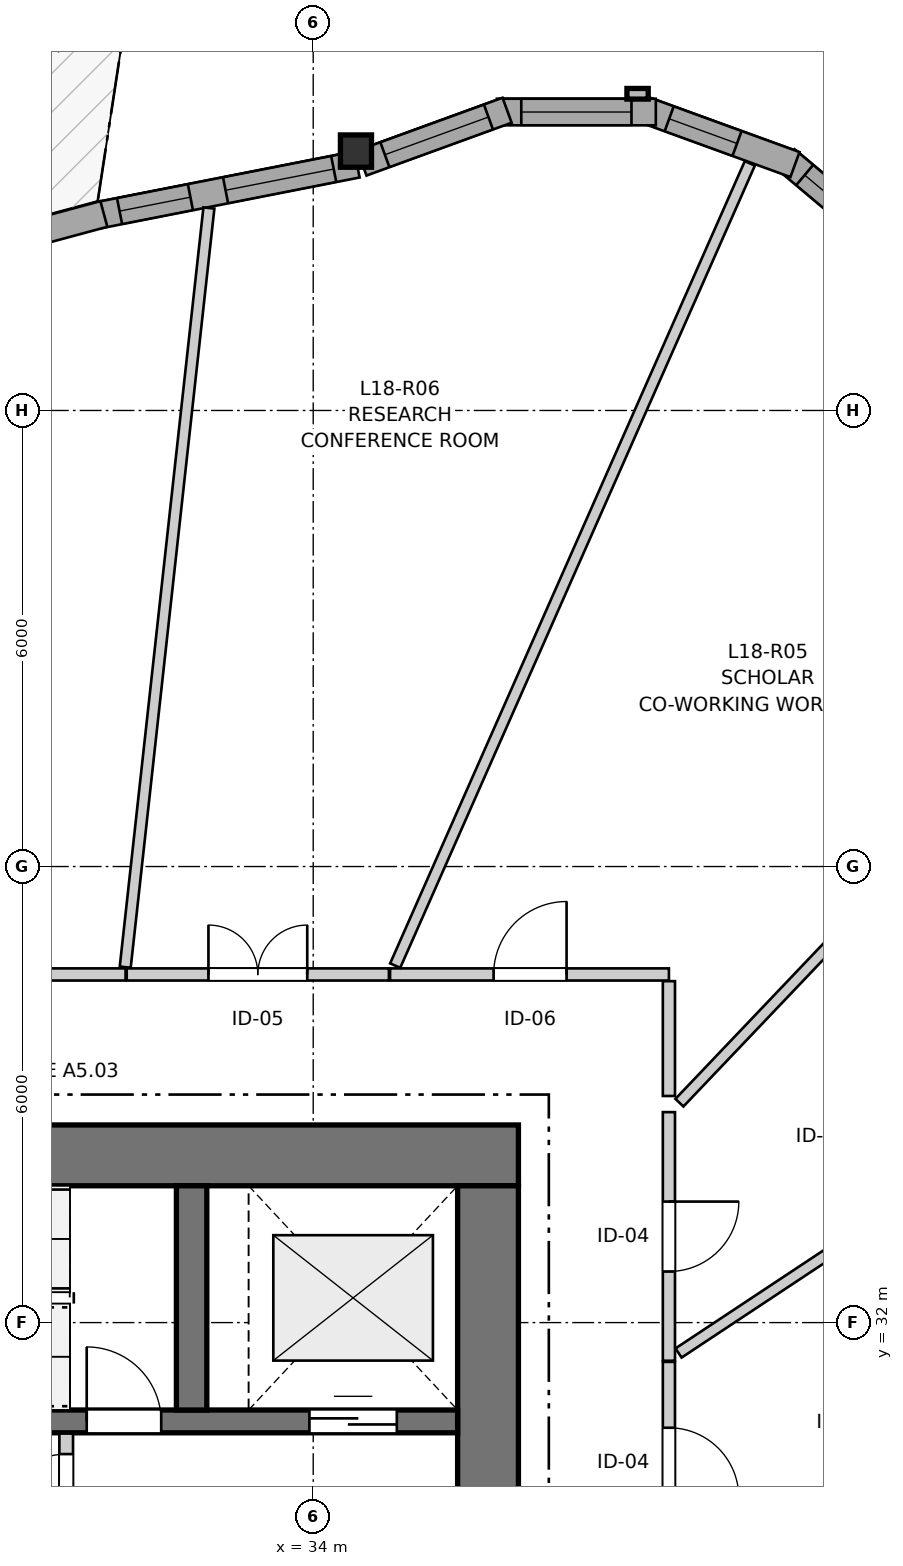
"""IFC4 building model, lengths in metres.
Left out: names, types, materials, properties, quantities, classifications, styles, units other than length and angle.
Written with IfcOpenShell. Run it as: python <this file> out.ifc"""

import sys

from ifc_helpers import new_model, si_unit, direction, frame, frame_2d, origin, origin_2d, place, context, subcontext, project, spatial, rectangle, i_section, extrude, source, transform, mapped, element, fill, save


model = new_model("IFC4")
c1 = context("Model", 3, precision=1e-05, world=origin(), true_north=direction((0.0, 1.0)))
c2 = subcontext(c1, "Body", "Model", "MODEL_VIEW")
j1 = project(units=[si_unit("LENGTHUNIT", "METRE"), si_unit("PLANEANGLEUNIT", "RADIAN")], contexts=[c1])
p1 = place(None, origin())
s1 = spatial("IfcSite", under=j1, at=p1, CompositionType="ELEMENT")
p2 = place(p1, origin())
s2 = spatial("IfcBuilding", under=s1, at=p2, CompositionType="ELEMENT")
p3 = place(p2, frame((0.0, 0.0, 62.2)))
s3 = spatial("IfcBuildingStorey", under=s2, at=p3, CompositionType="ELEMENT", Elevation=62.2)
p4 = place(p3, frame((36.7, 34.2, 0.0), z_axis=(0.0, 0.0, 1.0), x_axis=(-1.0, 0.0, 0.0)))
e1 = element("IfcWall", 1, at=p4, inside=s3, PredefinedType="SHEAR", context=c2, shape_type="SweptSolid", body=[
    extrude(rectangle(XDim=12.7, YDim=0.8, at=frame_2d((6.35, 0.0))), origin(), (0.0, 0.0, 1.0), 2.9),
])
p5 = place(p3, frame((36.3, 18.2, 0.0), z_axis=(0.0, 0.0, 1.0), x_axis=(0.0, 1.0, 0.0)))
e2 = element("IfcWall", 2, at=p5, inside=s3, PredefinedType="SHEAR", context=c2, shape_type="SweptSolid", body=[
    extrude(rectangle(XDim=15.6, YDim=0.8, at=frame_2d((7.8, 0.0))), origin(), (0.0, 0.0, 1.0), 2.9),
])
p6 = place(p5, frame((4.25, 0.0, 0.0)))
e3 = element("IfcOpeningElement", 3, at=p6, cuts=e2, PredefinedType="OPENING", context=c2, shape_type="SweptSolid", body=[
    extrude(rectangle(XDim=1.1, YDim=2.15, at=frame_2d((0.55, 1.075))), frame((0.0, 0.41, 0.0), z_axis=(0.0, -1.0, 0.0), x_axis=(1.0, 0.0, 0.0)), (0.0, 0.0, 1.0), 0.82),
])
p7 = place(p5, frame((10.25, 0.0, 0.0)))
e4 = element("IfcOpeningElement", 4, at=p7, cuts=e2, PredefinedType="OPENING", context=c2, shape_type="SweptSolid", body=[
    extrude(rectangle(XDim=1.1, YDim=2.15, at=frame_2d((0.55, 1.075))), frame((0.0, 0.41, 0.0), z_axis=(0.0, -1.0, 0.0), x_axis=(1.0, 0.0, 0.0)), (0.0, 0.0, 1.0), 0.82),
])
p8 = place(p3, frame((24.8, 30.7, 0.0), z_axis=(0.0, 0.0, 1.0), x_axis=(1.0, 0.0, 0.0)))
e5 = element("IfcWall", 5, at=p8, inside=s3, PredefinedType="SHEAR", context=c2, shape_type="SweptSolid", body=[
    extrude(rectangle(XDim=11.1, YDim=0.3, at=frame_2d((5.55, 0.0))), origin(), (0.0, 0.0, 1.0), 2.9),
])
p9 = place(p8, frame((6.22, 0.0, 0.0)))
e6 = element("IfcOpeningElement", 6, at=p9, cuts=e5, PredefinedType="OPENING", context=c2, shape_type="SweptSolid", body=[
    extrude(rectangle(XDim=0.98, YDim=2.15, at=frame_2d((0.49, 1.075))), frame((0.0, 0.16, 0.0), z_axis=(0.0, -1.0, 0.0), x_axis=(1.0, 0.0, 0.0)), (0.0, 0.0, 1.0), 0.32),
])
p10 = place(p8, frame((9.15, 0.0, 0.0)))
e7 = element("IfcOpeningElement", 7, at=p10, cuts=e5, PredefinedType="OPENING", context=c2, shape_type="SweptSolid", body=[
    extrude(rectangle(XDim=1.15, YDim=2.15, at=frame_2d((0.575, 1.075))), frame((0.0, 0.16, 0.0), z_axis=(0.0, -1.0, 0.0), x_axis=(1.0, 0.0, 0.0)), (0.0, 0.0, 1.0), 0.32),
])
p11 = place(p3, frame((32.4, 30.85, 0.0), z_axis=(0.0, 0.0, 1.0), x_axis=(0.0, 1.0, 0.0)))
e8 = element("IfcWall", 8, at=p11, inside=s3, PredefinedType="SHEAR", context=c2, shape_type="SweptSolid", body=[
    extrude(rectangle(XDim=2.95, YDim=0.4, at=frame_2d((1.475, 0.0))), origin(), (0.0, 0.0, 1.0), 2.9),
])
m1 = source(origin(), c2, "Body", "SweptSolid", [
    extrude(i_section(OverallWidth=0.409, OverallDepth=0.425, WebThickness=0.03, FlangeThickness=0.048, FilletRadius=0.015, at=origin_2d()), origin(), (0.0, 0.0, 1.0), 2.9),
])
p12 = place(p3, frame((34.562, 47.413, 0.0), z_axis=(0.0, 0.0, 1.0), x_axis=(1.0, 0.0, 0.0)))
e9 = element("IfcColumn", 9, at=p12, inside=s3, PredefinedType="PILASTER", context=c2, shape_type="MappedRepresentation", body=[
    mapped(m1, transform((0.0, 0.0, 0.0), x_axis=(1.0, 0.0, 0.0), y_axis=(0.0, 1.0, 0.0), z_axis=(0.0, 0.0, 1.0), scale=1.0)),
])
p13 = place(p3, frame((41.822, 45.959, 0.0), z_axis=(0.0, 0.0, 1.0), x_axis=(-0.766024572719, 0.642811289563, 0.0)))
e10 = element("IfcWall", 10, at=p13, inside=s3, PredefinedType="SOLIDWALL", context=c2, shape_type="SweptSolid", body=[
    extrude(rectangle(XDim=2.09, YDim=0.35, at=frame_2d((1.045, 0.0))), origin(), (0.0, 0.0, 1.0), 2.38),
])
p14 = place(p13, frame((0.32, 0.0, 0.82)))
e11 = element("IfcOpeningElement", 11, at=p14, cuts=e10, PredefinedType="OPENING", context=c2, shape_type="SweptSolid", body=[
    extrude(rectangle(XDim=1.45, YDim=1.25, at=frame_2d((0.725, 0.625))), frame((0.0, 0.185, 0.0), z_axis=(0.0, -1.0, 0.0), x_axis=(1.0, 0.0, 0.0)), (0.0, 0.0, 1.0), 0.37),
])
p15 = place(p3, frame((40.338, 47.235, 0.0), z_axis=(0.0, 0.0, 1.0), x_axis=(-0.939711556618, 0.341968113072, 0.0)))
e12 = element("IfcWall", 12, at=p15, inside=s3, PredefinedType="SOLIDWALL", context=c2, shape_type="SweptSolid", body=[
    extrude(rectangle(XDim=2.09, YDim=0.35, at=frame_2d((1.045, 0.0))), origin(), (0.0, 0.0, 1.0), 2.38),
])
p16 = place(p15, frame((0.811, 0.0, 0.82)))
e13 = element("IfcOpeningElement", 13, at=p16, cuts=e12, PredefinedType="OPENING", context=c2, shape_type="SweptSolid", body=[
    extrude(rectangle(XDim=0.95, YDim=1.35, at=frame_2d((0.475, 0.675))), frame((0.0, 0.185, 0.0), z_axis=(0.0, -1.0, 0.0), x_axis=(1.0, 0.0, 0.0)), (0.0, 0.0, 1.0), 0.37),
])
p17 = place(p3, frame((38.508, 47.927, 0.0), z_axis=(0.0, 0.0, 1.0), x_axis=(-1.0, 0.0, 0.0)))
e14 = element("IfcWall", 14, at=p17, inside=s3, PredefinedType="SOLIDWALL", context=c2, shape_type="SweptSolid", body=[
    extrude(rectangle(XDim=2.091, YDim=0.35, at=frame_2d((1.045, 0.0))), origin(), (0.0, 0.0, 1.0), 2.38),
])
p18 = place(p17, frame((0.32, 0.0, 0.82)))
e15 = element("IfcOpeningElement", 15, at=p18, cuts=e14, PredefinedType="OPENING", context=c2, shape_type="SweptSolid", body=[
    extrude(rectangle(XDim=1.45, YDim=1.25, at=frame_2d((0.725, 0.625))), frame((0.0, 0.185, 0.0), z_axis=(0.0, -1.0, 0.0), x_axis=(1.0, 0.0, 0.0)), (0.0, 0.0, 1.0), 0.37),
])
p19 = place(p3, frame((36.551, 47.95, 0.0), z_axis=(0.0, 0.0, 1.0), x_axis=(-0.939691662178, -0.342022777067, 0.0)))
e16 = element("IfcWall", 16, at=p19, inside=s3, PredefinedType="SOLIDWALL", context=c2, shape_type="SweptSolid", body=[
    extrude(rectangle(XDim=2.032, YDim=0.35, at=frame_2d((1.016, 0.0))), origin(), (0.0, 0.0, 1.0), 2.38),
])
p20 = place(p19, frame((0.261, 0.0, 0.82)))
e17 = element("IfcOpeningElement", 17, at=p20, cuts=e16, PredefinedType="OPENING", context=c2, shape_type="SweptSolid", body=[
    extrude(rectangle(XDim=1.45, YDim=1.25, at=frame_2d((0.725, 0.625))), frame((0.0, 0.185, 0.0), z_axis=(0.0, -1.0, 0.0), x_axis=(1.0, 0.0, 0.0)), (0.0, 0.0, 1.0), 0.37),
])
p21 = place(p3, frame((34.577, 47.237, 0.0), z_axis=(0.0, 0.0, 1.0), x_axis=(-0.981238400755, -0.192798342532, 0.0)))
e18 = element("IfcWall", 18, at=p21, inside=s3, PredefinedType="SOLIDWALL", context=c2, shape_type="SweptSolid", body=[
    extrude(rectangle(XDim=3.482, YDim=0.35, at=frame_2d((1.741, 0.0))), origin(), (0.0, 0.0, 1.0), 2.38),
])
p22 = place(p21, frame((0.313, 0.0, 0.82)))
e19 = element("IfcOpeningElement", 19, at=p22, cuts=e18, PredefinedType="OPENING", context=c2, shape_type="SweptSolid", body=[
    extrude(rectangle(XDim=1.45, YDim=1.25, at=frame_2d((0.725, 0.625))), frame((0.0, 0.185, 0.0), z_axis=(0.0, -1.0, 0.0), x_axis=(1.0, 0.0, 0.0)), (0.0, 0.0, 1.0), 0.37),
])
p23 = place(p21, frame((2.234, 0.0, 0.82)))
e20 = element("IfcOpeningElement", 20, at=p23, cuts=e18, PredefinedType="OPENING", context=c2, shape_type="SweptSolid", body=[
    extrude(rectangle(XDim=0.95, YDim=1.35, at=frame_2d((0.475, 0.675))), frame((0.0, 0.185, 0.0), z_axis=(0.0, -1.0, 0.0), x_axis=(1.0, 0.0, 0.0)), (0.0, 0.0, 1.0), 0.37),
])
p24 = place(p3, frame((31.246, 46.585, 0.0), z_axis=(0.0, 0.0, 1.0), x_axis=(-0.965469506164, -0.260516089076, 0.0)))
e21 = element("IfcWall", 21, at=p24, inside=s3, PredefinedType="SOLIDWALL", context=c2, shape_type="SweptSolid", body=[
    extrude(rectangle(XDim=3.13, YDim=0.35, at=frame_2d((1.565, 0.0))), origin(), (0.0, 0.0, 1.0), 2.38),
])
p25 = place(p24, frame((1.065, 0.0, 0.0)))
e22 = element("IfcOpeningElement", 22, at=p25, cuts=e21, PredefinedType="OPENING", context=c2, shape_type="SweptSolid", body=[
    extrude(rectangle(XDim=1.0, YDim=2.1, at=frame_2d((0.5, 1.05))), frame((0.0, 0.185, 0.0), z_axis=(0.0, -1.0, 0.0), x_axis=(1.0, 0.0, 0.0)), (0.0, 0.0, 1.0), 0.37),
])
p26 = place(p3, frame((30.75, 27.43, 0.0), z_axis=(0.0, 0.0, 1.0), x_axis=(0.0, 1.0, 0.0)))
e23 = element("IfcWall", 23, at=p26, inside=s3, PredefinedType="PARTITIONING", context=c2, shape_type="SweptSolid", body=[
    extrude(rectangle(XDim=3.11, YDim=0.18, at=frame_2d((1.555, 0.0))), origin(), (0.0, 0.0, 1.0), 2.9),
])
p27 = place(p26, frame((1.98, 0.0, 0.0)))
e24 = element("IfcOpeningElement", 24, at=p27, cuts=e23, PredefinedType="OPENING", context=c2, shape_type="SweptSolid", body=[
    extrude(rectangle(XDim=0.86, YDim=2.05, at=frame_2d((0.43, 1.025))), frame((0.0, 0.1, 0.0), z_axis=(0.0, -1.0, 0.0), x_axis=(1.0, 0.0, 0.0)), (0.0, 0.0, 1.0), 0.2),
])
p28 = place(p3, frame((27.192, 36.58, 0.0), z_axis=(0.0, 0.0, 1.0), x_axis=(1.0, 0.0, 0.0)))
e25 = element("IfcWall", 25, at=p28, inside=s3, PredefinedType="PARTITIONING", context=c2, shape_type="SweptSolid", body=[
    extrude(rectangle(XDim=4.339, YDim=0.16, at=frame_2d((2.169, 0.0))), origin(), (0.0, 0.0, 1.0), 2.9),
])
p29 = place(p28, frame((1.52, 0.0, 0.0)))
e26 = element("IfcOpeningElement", 26, at=p29, cuts=e25, PredefinedType="OPENING", context=c2, shape_type="SweptSolid", body=[
    extrude(rectangle(XDim=1.3, YDim=2.1, at=frame_2d((0.65, 1.05))), frame((0.0, 0.09, 0.0), z_axis=(0.0, -1.0, 0.0), x_axis=(1.0, 0.0, 0.0)), (0.0, 0.0, 1.0), 0.18),
])
p30 = place(p3, frame((35.011, 36.58, 0.0), z_axis=(0.0, 0.0, 1.0), x_axis=(1.0, 0.0, 0.0)))
e27 = element("IfcWall", 27, at=p30, inside=s3, PredefinedType="PARTITIONING", context=c2, shape_type="SweptSolid", body=[
    extrude(rectangle(XDim=3.669, YDim=0.16, at=frame_2d((1.834, 0.0))), origin(), (0.0, 0.0, 1.0), 2.9),
])
p31 = place(p30, frame((1.363, 0.0, 0.0)))
e28 = element("IfcOpeningElement", 28, at=p31, cuts=e27, PredefinedType="OPENING", context=c2, shape_type="SweptSolid", body=[
    extrude(rectangle(XDim=0.96, YDim=2.1, at=frame_2d((0.48, 1.05))), frame((0.0, 0.09, 0.0), z_axis=(0.0, -1.0, 0.0), x_axis=(1.0, 0.0, 0.0)), (0.0, 0.0, 1.0), 0.18),
])
p32 = place(p3, frame((31.546, 36.58, 0.0), z_axis=(0.0, 0.0, 1.0), x_axis=(1.0, 0.0, 0.0)))
e29 = element("IfcWall", 29, at=p32, inside=s3, PredefinedType="PARTITIONING", context=c2, shape_type="SweptSolid", body=[
    extrude(rectangle(XDim=3.45, YDim=0.16, at=frame_2d((1.725, 0.0))), origin(), (0.0, 0.0, 1.0), 2.9),
])
p33 = place(p32, frame((1.075, 0.0, 0.0)))
e30 = element("IfcOpeningElement", 30, at=p33, cuts=e29, PredefinedType="OPENING", context=c2, shape_type="SweptSolid", body=[
    extrude(rectangle(XDim=1.3, YDim=2.1, at=frame_2d((0.65, 1.05))), frame((0.0, 0.09, 0.0), z_axis=(0.0, -1.0, 0.0), x_axis=(1.0, 0.0, 0.0)), (0.0, 0.0, 1.0), 0.18),
])
p34 = place(p3, frame((38.68, 34.769, 0.0), z_axis=(0.0, 0.0, 1.0), x_axis=(0.0, -1.0, 0.0)))
e31 = element("IfcWall", 31, at=p34, inside=s3, PredefinedType="PARTITIONING", context=c2, shape_type="SweptSolid", body=[
    extrude(rectangle(XDim=3.271, YDim=0.16, at=frame_2d((1.635, 0.0))), origin(), (0.0, 0.0, 1.0), 2.9),
])
p35 = place(p34, frame((1.177, 0.0, 0.0)))
e32 = element("IfcOpeningElement", 32, at=p35, cuts=e31, PredefinedType="OPENING", context=c2, shape_type="SweptSolid", body=[
    extrude(rectangle(XDim=0.92, YDim=2.1, at=frame_2d((0.46, 1.05))), frame((0.0, 0.09, 0.0), z_axis=(0.0, -1.0, 0.0), x_axis=(1.0, 0.0, 0.0)), (0.0, 0.0, 1.0), 0.18),
])
p36 = place(p3, frame((38.68, 31.483, 0.0), z_axis=(0.0, 0.0, 1.0), x_axis=(0.0, -1.0, 0.0)))
e33 = element("IfcWall", 33, at=p36, inside=s3, PredefinedType="PARTITIONING", context=c2, shape_type="SweptSolid", body=[
    extrude(rectangle(XDim=2.702, YDim=0.16, at=frame_2d((1.351, 0.0))), origin(), (0.0, 0.0, 1.0), 2.9),
])
p37 = place(p36, frame((0.866, 0.0, 0.0)))
e34 = element("IfcOpeningElement", 34, at=p37, cuts=e33, PredefinedType="OPENING", context=c2, shape_type="SweptSolid", body=[
    extrude(rectangle(XDim=0.92, YDim=2.1, at=frame_2d((0.46, 1.05))), frame((0.0, 0.09, 0.0), z_axis=(0.0, -1.0, 0.0), x_axis=(1.0, 0.0, 0.0)), (0.0, 0.0, 1.0), 0.18),
])
p38 = place(p3, frame((35.079, 36.697, 0.0), z_axis=(0.0, 0.0, 1.0), x_axis=(0.404349483928, 0.914604556542, 0.0)))
e35 = element("IfcWall", 35, at=p38, inside=s3, PredefinedType="PARTITIONING", context=c2, shape_type="SweptSolid", body=[
    extrude(rectangle(XDim=11.54, YDim=0.145, at=frame_2d((5.77, 0.0))), origin(), (0.0, 0.0, 1.0), 2.9),
])
p39 = place(p3, frame((31.527, 36.676, 0.0), z_axis=(0.0, 0.0, 1.0), x_axis=(0.109575491405, 0.993978476469, 0.0)))
e36 = element("IfcWall", 36, at=p39, inside=s3, PredefinedType="PARTITIONING", context=c2, shape_type="SweptSolid", body=[
    extrude(rectangle(XDim=10.049, YDim=0.145, at=frame_2d((5.024, 0.0))), origin(), (0.0, 0.0, 1.0), 2.9),
])
p40 = place(p3, frame((38.818, 34.893, 0.0), z_axis=(0.0, 0.0, 1.0), x_axis=(0.68961378572, 0.724177344678, 0.0)))
e37 = element("IfcWall", 37, at=p40, inside=s3, PredefinedType="PARTITIONING", context=c2, shape_type="SweptSolid", body=[
    extrude(rectangle(XDim=7.071, YDim=0.145, at=frame_2d((3.535, 0.0))), origin(), (0.0, 0.0, 1.0), 2.9),
])
p41 = place(p3, frame((38.807, 31.6, 0.0), z_axis=(0.0, 0.0, 1.0), x_axis=(0.833690999351, 0.552231217518, 0.0)))
e38 = element("IfcWall", 38, at=p41, inside=s3, PredefinedType="PARTITIONING", context=c2, shape_type="SweptSolid", body=[
    extrude(rectangle(XDim=3.426, YDim=0.145, at=frame_2d((1.713, 0.0))), origin(), (0.0, 0.0, 1.0), 2.9),
])
p42 = place(p3, frame((38.68, 34.981, 0.0), z_axis=(0.0, 0.0, 1.0), x_axis=(0.0, 1.0, 0.0)))
e39 = element("IfcWall", 39, at=p42, inside=s3, PredefinedType="PARTITIONING", context=c2, shape_type="SweptSolid", body=[
    extrude(rectangle(XDim=1.511, YDim=0.16, at=frame_2d((0.755, 0.0))), origin(), (0.0, 0.0, 1.0), 2.9),
])
m2 = source(origin(), c2, "Body", "SweptSolid", [
    extrude(rectangle(XDim=1.45, YDim=1.25, at=frame_2d((0.725, 0.625))), frame((0.0, 0.03, 0.0), z_axis=(0.0, -1.0, 0.0), x_axis=(1.0, 0.0, 0.0)), (0.0, 0.0, 1.0), 0.06),
])
p43 = place(p14, origin())
e40 = element("IfcWindow", 40, at=p43, inside=s3, PartitioningType="SINGLE_PANEL", PredefinedType="WINDOW", context=c2, shape_type="MappedRepresentation", body=[
    mapped(m2, transform((0.0, 0.0, 0.0), x_axis=(1.0, 0.0, 0.0), y_axis=(0.0, 1.0, 0.0), z_axis=(0.0, 0.0, 1.0), scale=1.0)),
])
fill(e11, e40)
m3 = source(origin(), c2, "Body", "SweptSolid", [
    extrude(rectangle(XDim=0.95, YDim=1.35, at=frame_2d((0.475, 0.675))), frame((0.0, 0.03, 0.0), z_axis=(0.0, -1.0, 0.0), x_axis=(1.0, 0.0, 0.0)), (0.0, 0.0, 1.0), 0.06),
])
p44 = place(p16, origin())
e41 = element("IfcWindow", 41, at=p44, inside=s3, PartitioningType="SINGLE_PANEL", PredefinedType="WINDOW", context=c2, shape_type="MappedRepresentation", body=[
    mapped(m3, transform((0.0, 0.0, 0.0), x_axis=(1.0, 0.0, 0.0), y_axis=(0.0, 1.0, 0.0), z_axis=(0.0, 0.0, 1.0), scale=1.0)),
])
fill(e13, e41)
p45 = place(p18, origin())
e42 = element("IfcWindow", 42, at=p45, inside=s3, PartitioningType="SINGLE_PANEL", PredefinedType="WINDOW", context=c2, shape_type="MappedRepresentation", body=[
    mapped(m2, transform((0.0, 0.0, 0.0), x_axis=(1.0, 0.0, 0.0), y_axis=(0.0, 1.0, 0.0), z_axis=(0.0, 0.0, 1.0), scale=1.0)),
])
fill(e15, e42)
p46 = place(p20, origin())
e43 = element("IfcWindow", 43, at=p46, inside=s3, PartitioningType="SINGLE_PANEL", PredefinedType="WINDOW", context=c2, shape_type="MappedRepresentation", body=[
    mapped(m2, transform((0.0, 0.0, 0.0), x_axis=(1.0, 0.0, 0.0), y_axis=(0.0, 1.0, 0.0), z_axis=(0.0, 0.0, 1.0), scale=1.0)),
])
fill(e17, e43)
p47 = place(p22, origin())
e44 = element("IfcWindow", 44, at=p47, inside=s3, PartitioningType="SINGLE_PANEL", PredefinedType="WINDOW", context=c2, shape_type="MappedRepresentation", body=[
    mapped(m2, transform((0.0, 0.0, 0.0), x_axis=(1.0, 0.0, 0.0), y_axis=(0.0, 1.0, 0.0), z_axis=(0.0, 0.0, 1.0), scale=1.0)),
])
fill(e19, e44)
p48 = place(p23, origin())
e45 = element("IfcWindow", 45, at=p48, inside=s3, PartitioningType="SINGLE_PANEL", PredefinedType="WINDOW", context=c2, shape_type="MappedRepresentation", body=[
    mapped(m3, transform((0.0, 0.0, 0.0), x_axis=(1.0, 0.0, 0.0), y_axis=(0.0, 1.0, 0.0), z_axis=(0.0, 0.0, 1.0), scale=1.0)),
])
fill(e20, e45)
m4 = source(origin(), c2, "Body", "SweptSolid", [
    extrude(rectangle(XDim=0.98, YDim=2.15, at=frame_2d((0.49, 1.075))), frame((0.0, 0.025, 0.0), z_axis=(0.0, -1.0, 0.0), x_axis=(1.0, 0.0, 0.0)), (0.0, 0.0, 1.0), 0.05),
])
p49 = place(p9, origin())
e46 = element("IfcDoor", 46, at=p49, inside=s3, OperationType="SINGLE_SWING_LEFT", PredefinedType="DOOR", context=c2, shape_type="MappedRepresentation", body=[
    mapped(m4, transform((0.0, 0.0, 0.0), x_axis=(1.0, 0.0, 0.0), y_axis=(0.0, 1.0, 0.0), z_axis=(0.0, 0.0, 1.0), scale=1.0)),
])
fill(e6, e46)
m5 = source(origin(), c2, "Body", "SweptSolid", [
    extrude(rectangle(XDim=1.15, YDim=2.15, at=frame_2d((0.575, 1.075))), frame((0.0, 0.025, 0.0), z_axis=(0.0, -1.0, 0.0), x_axis=(1.0, 0.0, 0.0)), (0.0, 0.0, 1.0), 0.05),
])
p50 = place(p10, origin())
e47 = element("IfcDoor", 47, at=p50, inside=s3, OperationType="DOUBLE_DOOR_SLIDING", PredefinedType="DOOR", context=c2, shape_type="MappedRepresentation", body=[
    mapped(m5, transform((0.0, 0.0, 0.0), x_axis=(1.0, 0.0, 0.0), y_axis=(0.0, 1.0, 0.0), z_axis=(0.0, 0.0, 1.0), scale=1.0)),
])
fill(e7, e47)
m6 = source(origin(), c2, "Body", "SweptSolid", [
    extrude(rectangle(XDim=0.86, YDim=2.05, at=frame_2d((0.43, 1.025))), frame((0.0, 0.025, 0.0), z_axis=(0.0, -1.0, 0.0), x_axis=(1.0, 0.0, 0.0)), (0.0, 0.0, 1.0), 0.05),
])
p51 = place(p27, origin())
e48 = element("IfcDoor", 48, at=p51, inside=s3, OperationType="SINGLE_SWING_LEFT", PredefinedType="DOOR", context=c2, shape_type="MappedRepresentation", body=[
    mapped(m6, transform((0.0, 0.0, 0.0), x_axis=(1.0, 0.0, 0.0), y_axis=(0.0, 1.0, 0.0), z_axis=(0.0, 0.0, 1.0), scale=1.0)),
])
fill(e24, e48)
m7 = source(origin(), c2, "Body", "SweptSolid", [
    extrude(rectangle(XDim=0.96, YDim=2.1, at=frame_2d((0.48, 1.05))), frame((0.0, 0.025, 0.0), z_axis=(0.0, -1.0, 0.0), x_axis=(1.0, 0.0, 0.0)), (0.0, 0.0, 1.0), 0.05),
])
p52 = place(p31, origin())
e49 = element("IfcDoor", 49, at=p52, inside=s3, OperationType="SINGLE_SWING_RIGHT", PredefinedType="DOOR", context=c2, shape_type="MappedRepresentation", body=[
    mapped(m7, transform((0.0, 0.0, 0.0), x_axis=(1.0, 0.0, 0.0), y_axis=(0.0, 1.0, 0.0), z_axis=(0.0, 0.0, 1.0), scale=1.0)),
])
fill(e28, e49)
m8 = source(origin(), c2, "Body", "SweptSolid", [
    extrude(rectangle(XDim=1.3, YDim=2.1, at=frame_2d((0.65, 1.05))), frame((0.0, 0.025, 0.0), z_axis=(0.0, -1.0, 0.0), x_axis=(1.0, 0.0, 0.0)), (0.0, 0.0, 1.0), 0.05),
])
p53 = place(p33, origin())
e50 = element("IfcDoor", 50, at=p53, inside=s3, OperationType="DOUBLE_DOOR_SINGLE_SWING", PredefinedType="DOOR", context=c2, shape_type="MappedRepresentation", body=[
    mapped(m8, transform((0.0, 0.0, 0.0), x_axis=(1.0, 0.0, 0.0), y_axis=(0.0, 1.0, 0.0), z_axis=(0.0, 0.0, 1.0), scale=1.0)),
])
fill(e30, e50)
m9 = source(origin(), c2, "Body", "SweptSolid", [
    extrude(rectangle(XDim=0.92, YDim=2.1, at=frame_2d((0.46, 1.05))), frame((0.0, 0.025, 0.0), z_axis=(0.0, -1.0, 0.0), x_axis=(1.0, 0.0, 0.0)), (0.0, 0.0, 1.0), 0.05),
])
p54 = place(p35, origin())
e51 = element("IfcDoor", 51, at=p54, inside=s3, OperationType="SINGLE_SWING_LEFT", PredefinedType="DOOR", context=c2, shape_type="MappedRepresentation", body=[
    mapped(m9, transform((0.0, 0.0, 0.0), x_axis=(1.0, 0.0, 0.0), y_axis=(0.0, 1.0, 0.0), z_axis=(0.0, 0.0, 1.0), scale=1.0)),
])
fill(e32, e51)
p55 = place(p37, origin())
e52 = element("IfcDoor", 52, at=p55, inside=s3, OperationType="SINGLE_SWING_RIGHT", PredefinedType="DOOR", context=c2, shape_type="MappedRepresentation", body=[
    mapped(m9, transform((0.0, 0.0, 0.0), x_axis=(1.0, 0.0, 0.0), y_axis=(0.0, 1.0, 0.0), z_axis=(0.0, 0.0, 1.0), scale=1.0)),
])
fill(e34, e52)
save(model, sys.argv[1])
